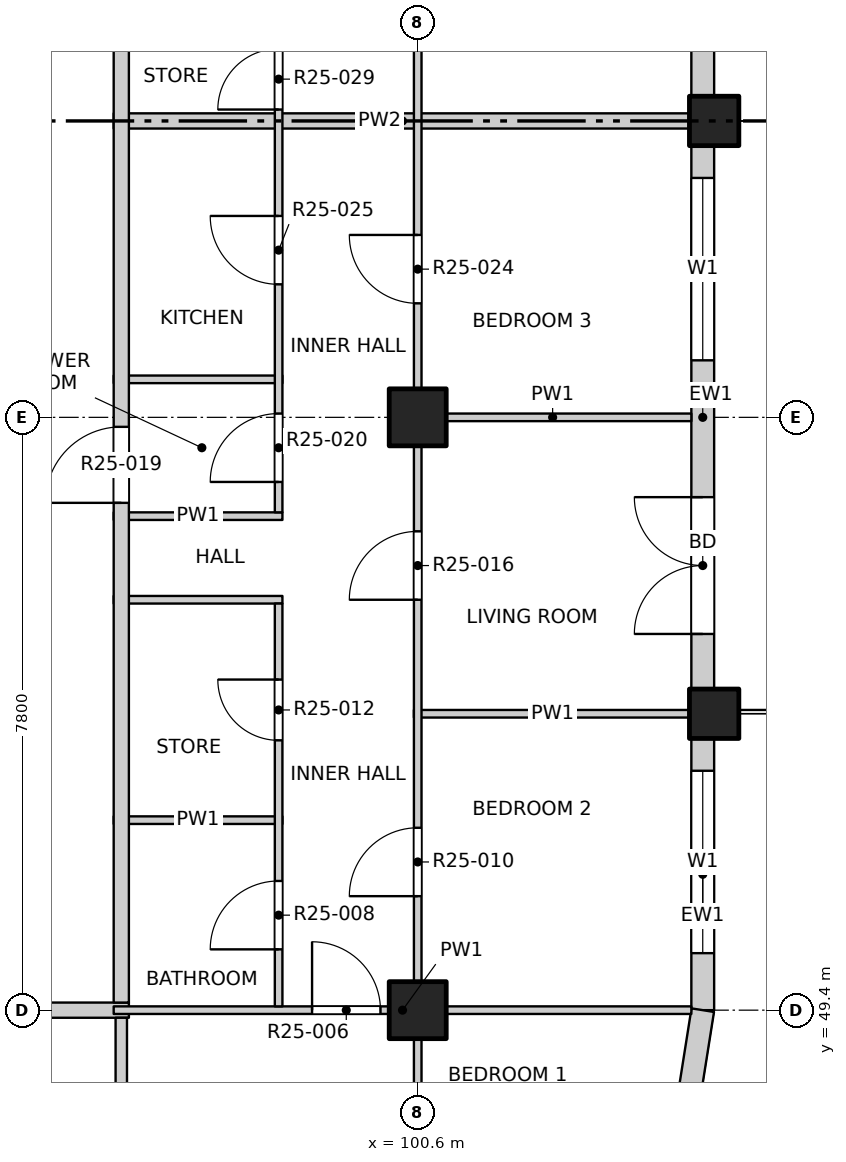
"""IFC4 building model, lengths in metres.
Left out: names, types, materials, properties, quantities, classifications, styles, units other than length and angle.
Written with IfcOpenShell. Run it as: python <this file> out.ifc"""

import sys

from ifc_helpers import new_model, si_unit, direction, frame, frame_2d, origin, origin_2d, place, context, subcontext, project, spatial, rectangle, extrude, element, fill, save


model = new_model("IFC4")
c1 = context("Model", 3, precision=1e-05, world=origin(), true_north=direction((0.0, 1.0)))
c2 = subcontext(c1, "Body", "Model", "MODEL_VIEW")
j1 = project(units=[si_unit("LENGTHUNIT", "METRE"), si_unit("PLANEANGLEUNIT", "RADIAN")], contexts=[c1])
p1 = place(None, origin())
s1 = spatial("IfcSite", under=j1, at=p1, CompositionType="ELEMENT")
p2 = place(p1, origin())
s2 = spatial("IfcBuilding", under=s1, at=p2, CompositionType="ELEMENT")
p3 = place(p2, frame((0.0, 0.0, 252.8)))
s3 = spatial("IfcBuildingStorey", under=s2, at=p3, CompositionType="ELEMENT", Elevation=252.8)
for number, where, z_axis, x_axis in (
    (1, (104.5, 53.3, -0.25), (0.0, 0.0, 1.0), (1.0, 0.0, 0.0)),
    (2, (104.5, 61.1, -0.25), (0.0, 0.0, 1.0), (1.0, 0.0, 0.0)),
):
    element("IfcColumn", number, at=place(p3, frame(where, z_axis=z_axis, x_axis=x_axis)), inside=s3, PredefinedType="COLUMN", context=c2, shape_type="SweptSolid", body=[
        extrude(rectangle(XDim=0.65, YDim=0.65, at=origin_2d()), origin(), (0.0, 0.0, 1.0), 3.4),
    ])
for number, where, z_axis, x_axis in (
    (3, (100.6, 49.4, -0.25), (0.0, 0.0, 1.0), (1.0, 0.0, 0.0)),
    (4, (100.6, 57.2, -0.25), (0.0, 0.0, 1.0), (1.0, 0.0, 0.0)),
):
    element("IfcColumn", number, at=place(p3, frame(where, z_axis=z_axis, x_axis=x_axis)), inside=s3, PredefinedType="COLUMN", context=c2, shape_type="SweptSolid", body=[
        extrude(rectangle(XDim=0.75, YDim=0.75, at=origin_2d()), origin(), (0.0, 0.0, 1.0), 3.4),
    ])
p4 = place(p3, frame((104.35, 49.4, 0.0), z_axis=(0.0, 0.0, 1.0), x_axis=(0.0, 1.0, 0.0)))
e5 = element("IfcWall", 5, at=p4, inside=s3, PredefinedType="SOLIDWALL", context=c2, shape_type="SweptSolid", body=[
    extrude(rectangle(XDim=3.575, YDim=0.3, at=frame_2d((1.788, 0.0))), origin(), (0.0, 0.0, 1.0), 2.7),
])
p5 = place(p4, frame((0.75, 0.0, 0.9)))
e6 = element("IfcOpeningElement", 6, at=p5, cuts=e5, PredefinedType="OPENING", context=c2, shape_type="SweptSolid", body=[
    extrude(rectangle(XDim=2.4, YDim=1.8, at=frame_2d((1.2, 0.9))), frame((0.0, 0.16, 0.0), z_axis=(0.0, -1.0, 0.0), x_axis=(1.0, 0.0, 0.0)), (0.0, 0.0, 1.0), 0.32),
])
p6 = place(p3, frame((104.35, 53.625, 0.0), z_axis=(0.0, 0.0, 1.0), x_axis=(0.0, 1.0, 0.0)))
e7 = element("IfcWall", 7, at=p6, inside=s3, PredefinedType="SOLIDWALL", context=c2, shape_type="SweptSolid", body=[
    extrude(rectangle(XDim=7.15, YDim=0.3, at=frame_2d((3.575, 0.0))), origin(), (0.0, 0.0, 1.0), 2.7),
])
p7 = place(p6, frame((0.725, 0.0, 0.0)))
e8 = element("IfcOpeningElement", 8, at=p7, cuts=e7, PredefinedType="OPENING", context=c2, shape_type="SweptSolid", body=[
    extrude(rectangle(XDim=1.8, YDim=2.4, at=frame_2d((0.9, 1.2))), frame((0.0, 0.16, 0.0), z_axis=(0.0, -1.0, 0.0), x_axis=(1.0, 0.0, 0.0)), (0.0, 0.0, 1.0), 0.32),
])
p8 = place(p6, frame((4.325, 0.0, 0.9)))
e9 = element("IfcOpeningElement", 9, at=p8, cuts=e7, PredefinedType="OPENING", context=c2, shape_type="SweptSolid", body=[
    extrude(rectangle(XDim=2.4, YDim=1.8, at=frame_2d((1.2, 0.9))), frame((0.0, 0.16, 0.0), z_axis=(0.0, -1.0, 0.0), x_axis=(1.0, 0.0, 0.0)), (0.0, 0.0, 1.0), 0.32),
])
p9 = place(p3, frame((104.35, 61.425, 0.0), z_axis=(0.0, 0.0, 1.0), x_axis=(0.0, 1.0, 0.0)))
e10 = element("IfcWall", 10, at=p9, inside=s3, PredefinedType="SOLIDWALL", context=c2, shape_type="SweptSolid", body=[
    extrude(rectangle(XDim=7.15, YDim=0.3, at=frame_2d((3.575, 0.0))), origin(), (0.0, 0.0, 1.0), 2.7),
])
p10 = place(p9, frame((0.725, 0.0, 0.0)))
e11 = element("IfcOpeningElement", 11, at=p10, cuts=e10, PredefinedType="OPENING", context=c2, shape_type="SweptSolid", body=[
    extrude(rectangle(XDim=1.8, YDim=2.4, at=frame_2d((0.9, 1.2))), frame((0.0, 0.16, 0.0), z_axis=(0.0, -1.0, 0.0), x_axis=(1.0, 0.0, 0.0)), (0.0, 0.0, 1.0), 0.32),
])
p11 = place(p9, frame((4.325, 0.0, 0.9)))
e12 = element("IfcOpeningElement", 12, at=p11, cuts=e10, PredefinedType="OPENING", context=c2, shape_type="SweptSolid", body=[
    extrude(rectangle(XDim=2.4, YDim=1.8, at=frame_2d((1.2, 0.9))), frame((0.0, 0.16, 0.0), z_axis=(0.0, -1.0, 0.0), x_axis=(1.0, 0.0, 0.0)), (0.0, 0.0, 1.0), 0.32),
])
p12 = place(p3, frame((104.167, 48.241, 0.0), z_axis=(0.0, 0.0, 1.0), x_axis=(0.156496880861, 0.987678452879, 0.0)))
e13 = element("IfcWall", 13, at=p12, inside=s3, PredefinedType="SOLIDWALL", context=c2, shape_type="SweptSolid", body=[
    extrude(rectangle(XDim=1.173, YDim=0.3, at=frame_2d((0.586, 0.0))), origin(), (0.0, 0.0, 1.0), 2.7),
])
p13 = place(p3, frame((73.2, 49.4, 0.0), z_axis=(0.0, 0.0, 1.0), x_axis=(1.0, 0.0, 0.0)))
e14 = element("IfcWall", 14, at=p13, inside=s3, PredefinedType="PARTITIONING", context=c2, shape_type="SweptSolid", body=[
    extrude(rectangle(XDim=23.6, YDim=0.2, at=frame_2d((11.8, 0.0))), origin(), (0.0, 0.0, 1.0), 3.15),
])
p14 = place(p13, frame((2.325, 0.0, 0.0)))
e15 = element("IfcOpeningElement", 15, at=p14, cuts=e14, PredefinedType="OPENING", context=c2, shape_type="SweptSolid", body=[
    extrude(rectangle(XDim=1.2, YDim=2.1, at=frame_2d((0.6, 1.05))), frame((0.0, 0.11, 0.0), z_axis=(0.0, -1.0, 0.0), x_axis=(1.0, 0.0, 0.0)), (0.0, 0.0, 1.0), 0.22),
])
p15 = place(p13, frame((15.1, 0.0, 0.0)))
e16 = element("IfcOpeningElement", 16, at=p15, cuts=e14, PredefinedType="OPENING", context=c2, shape_type="SweptSolid", body=[
    extrude(rectangle(XDim=1.2, YDim=2.1, at=frame_2d((0.6, 1.05))), frame((0.0, 0.11, 0.0), z_axis=(0.0, -1.0, 0.0), x_axis=(1.0, 0.0, 0.0)), (0.0, 0.0, 1.0), 0.22),
])
p16 = place(p3, frame((96.6, 49.4, 0.0), z_axis=(0.0, 0.0, 1.0), x_axis=(1.0, 0.0, 0.0)))
e17 = element("IfcWall", 17, at=p16, inside=s3, PredefinedType="PARTITIONING", context=c2, shape_type="SweptSolid", body=[
    extrude(rectangle(XDim=7.6, YDim=0.1, at=frame_2d((3.8, 0.0))), origin(), (0.0, 0.0, 1.0), 3.15),
])
p17 = place(p16, frame((2.61, 0.0, 0.0)))
e18 = element("IfcOpeningElement", 18, at=p17, cuts=e17, PredefinedType="OPENING", context=c2, shape_type="SweptSolid", body=[
    extrude(rectangle(XDim=0.9, YDim=2.1, at=frame_2d((0.45, 1.05))), frame((0.0, 0.06, 0.0), z_axis=(0.0, -1.0, 0.0), x_axis=(1.0, 0.0, 0.0)), (0.0, 0.0, 1.0), 0.12),
])
p18 = place(p3, frame((96.6, 51.9, 0.0), z_axis=(0.0, 0.0, 1.0), x_axis=(1.0, 0.0, 0.0)))
e19 = element("IfcWall", 19, at=p18, inside=s3, PredefinedType="PARTITIONING", context=c2, shape_type="SweptSolid", body=[
    extrude(rectangle(XDim=2.22, YDim=0.1, at=frame_2d((1.11, 0.0))), origin(), (0.0, 0.0, 1.0), 3.15),
])
p19 = place(p3, frame((100.55, 53.3, 0.0), z_axis=(0.0, 0.0, 1.0), x_axis=(1.0, 0.0, 0.0)))
e20 = element("IfcWall", 20, at=p19, inside=s3, PredefinedType="PARTITIONING", context=c2, shape_type="SweptSolid", body=[
    extrude(rectangle(XDim=3.65, YDim=0.1, at=frame_2d((1.825, 0.0))), origin(), (0.0, 0.0, 1.0), 3.15),
])
for number, where, z_axis, x_axis in (
    (21, (96.6, 54.8, 0.0), (0.0, 0.0, 1.0), (1.0, 0.0, 0.0)),
    (22, (96.6, 55.9, 0.0), (0.0, 0.0, 1.0), (1.0, 0.0, 0.0)),
):
    element("IfcWall", number, at=place(p3, frame(where, z_axis=z_axis, x_axis=x_axis)), inside=s3, PredefinedType="PARTITIONING", context=c2, shape_type="SweptSolid", body=[
        extrude(rectangle(XDim=2.22, YDim=0.1, at=frame_2d((1.11, 0.0))), origin(), (0.0, 0.0, 1.0), 3.15),
    ])
p20 = place(p3, frame((100.55, 57.2, 0.0), z_axis=(0.0, 0.0, 1.0), x_axis=(1.0, 0.0, 0.0)))
e23 = element("IfcWall", 23, at=p20, inside=s3, PredefinedType="PARTITIONING", context=c2, shape_type="SweptSolid", body=[
    extrude(rectangle(XDim=3.65, YDim=0.1, at=frame_2d((1.825, 0.0))), origin(), (0.0, 0.0, 1.0), 3.15),
])
p21 = place(p3, frame((96.6, 57.7, 0.0), z_axis=(0.0, 0.0, 1.0), x_axis=(1.0, 0.0, 0.0)))
e24 = element("IfcWall", 24, at=p21, inside=s3, PredefinedType="PARTITIONING", context=c2, shape_type="SweptSolid", body=[
    extrude(rectangle(XDim=2.22, YDim=0.1, at=frame_2d((1.11, 0.0))), origin(), (0.0, 0.0, 1.0), 3.15),
])
p22 = place(p3, frame((96.6, 61.1, 0.0), z_axis=(0.0, 0.0, 1.0), x_axis=(1.0, 0.0, 0.0)))
e25 = element("IfcWall", 25, at=p22, inside=s3, PredefinedType="PARTITIONING", context=c2, shape_type="SweptSolid", body=[
    extrude(rectangle(XDim=7.6, YDim=0.2, at=frame_2d((3.8, 0.0))), origin(), (0.0, 0.0, 1.0), 2.55),
])
p23 = place(p3, frame((96.7, 45.8, 0.0), z_axis=(0.0, 0.0, 1.0), x_axis=(0.0, 1.0, 0.0)))
e26 = element("IfcWall", 26, at=p23, inside=s3, PredefinedType="PARTITIONING", context=c2, shape_type="SweptSolid", body=[
    extrude(rectangle(XDim=3.5, YDim=0.15, at=frame_2d((1.75, 0.0))), origin(), (0.0, 0.0, 1.0), 3.15),
])
p24 = place(p3, frame((96.7, 49.5, 0.0), z_axis=(0.0, 0.0, 1.0), x_axis=(0.0, 1.0, 0.0)))
e27 = element("IfcWall", 27, at=p24, inside=s3, PredefinedType="PARTITIONING", context=c2, shape_type="SweptSolid", body=[
    extrude(rectangle(XDim=34.7, YDim=0.2, at=frame_2d((17.35, 0.0))), origin(), (0.0, 0.0, 1.0), 3.15),
])
p25 = place(p24, frame((6.575, 0.0, 0.0)))
e28 = element("IfcOpeningElement", 28, at=p25, cuts=e27, PredefinedType="OPENING", context=c2, shape_type="SweptSolid", body=[
    extrude(rectangle(XDim=1.0, YDim=2.1, at=frame_2d((0.5, 1.05))), frame((0.0, 0.11, 0.0), z_axis=(0.0, -1.0, 0.0), x_axis=(1.0, 0.0, 0.0)), (0.0, 0.0, 1.0), 0.22),
])
p26 = place(p24, frame((13.975, 0.0, 0.0)))
e29 = element("IfcOpeningElement", 29, at=p26, cuts=e27, PredefinedType="OPENING", context=c2, shape_type="SweptSolid", body=[
    extrude(rectangle(XDim=1.0, YDim=2.1, at=frame_2d((0.5, 1.05))), frame((0.0, 0.11, 0.0), z_axis=(0.0, -1.0, 0.0), x_axis=(1.0, 0.0, 0.0)), (0.0, 0.0, 1.0), 0.22),
])
p27 = place(p24, frame((26.525, 0.0, 0.0)))
e30 = element("IfcOpeningElement", 30, at=p27, cuts=e27, PredefinedType="OPENING", context=c2, shape_type="SweptSolid", body=[
    extrude(rectangle(XDim=1.0, YDim=2.1, at=frame_2d((0.5, 1.05))), frame((0.0, 0.11, 0.0), z_axis=(0.0, -1.0, 0.0), x_axis=(1.0, 0.0, 0.0)), (0.0, 0.0, 1.0), 0.22),
])
p28 = place(p3, frame((98.77, 49.45, 0.0), z_axis=(0.0, 0.0, 1.0), x_axis=(0.0, 1.0, 0.0)))
e31 = element("IfcWall", 31, at=p28, inside=s3, PredefinedType="PARTITIONING", context=c2, shape_type="SweptSolid", body=[
    extrude(rectangle(XDim=5.3, YDim=0.1, at=frame_2d((2.65, 0.0))), origin(), (0.0, 0.0, 1.0), 3.15),
])
p29 = place(p28, frame((0.75, 0.0, 0.0)))
e32 = element("IfcOpeningElement", 32, at=p29, cuts=e31, PredefinedType="OPENING", context=c2, shape_type="SweptSolid", body=[
    extrude(rectangle(XDim=0.9, YDim=2.1, at=frame_2d((0.45, 1.05))), frame((0.0, 0.06, 0.0), z_axis=(0.0, -1.0, 0.0), x_axis=(1.0, 0.0, 0.0)), (0.0, 0.0, 1.0), 0.12),
])
p30 = place(p28, frame((3.5, 0.0, 0.0)))
e33 = element("IfcOpeningElement", 33, at=p30, cuts=e31, PredefinedType="OPENING", context=c2, shape_type="SweptSolid", body=[
    extrude(rectangle(XDim=0.8, YDim=2.1, at=frame_2d((0.4, 1.05))), frame((0.0, 0.06, 0.0), z_axis=(0.0, -1.0, 0.0), x_axis=(1.0, 0.0, 0.0)), (0.0, 0.0, 1.0), 0.12),
])
p31 = place(p3, frame((98.77, 55.95, 0.0), z_axis=(0.0, 0.0, 1.0), x_axis=(0.0, 1.0, 0.0)))
e34 = element("IfcWall", 34, at=p31, inside=s3, PredefinedType="PARTITIONING", context=c2, shape_type="SweptSolid", body=[
    extrude(rectangle(XDim=6.2, YDim=0.1, at=frame_2d((3.1, 0.0))), origin(), (0.0, 0.0, 1.0), 3.15),
])
p32 = place(p31, frame((0.4, 0.0, 0.0)))
e35 = element("IfcOpeningElement", 35, at=p32, cuts=e34, PredefinedType="OPENING", context=c2, shape_type="SweptSolid", body=[
    extrude(rectangle(XDim=0.9, YDim=2.1, at=frame_2d((0.45, 1.05))), frame((0.0, 0.06, 0.0), z_axis=(0.0, -1.0, 0.0), x_axis=(1.0, 0.0, 0.0)), (0.0, 0.0, 1.0), 0.12),
])
p33 = place(p31, frame((3.0, 0.0, 0.0)))
e36 = element("IfcOpeningElement", 36, at=p33, cuts=e34, PredefinedType="OPENING", context=c2, shape_type="SweptSolid", body=[
    extrude(rectangle(XDim=0.9, YDim=2.1, at=frame_2d((0.45, 1.05))), frame((0.0, 0.06, 0.0), z_axis=(0.0, -1.0, 0.0), x_axis=(1.0, 0.0, 0.0)), (0.0, 0.0, 1.0), 0.12),
])
p34 = place(p31, frame((5.3, 0.0, 0.0)))
e37 = element("IfcOpeningElement", 37, at=p34, cuts=e34, PredefinedType="OPENING", context=c2, shape_type="SweptSolid", body=[
    extrude(rectangle(XDim=0.8, YDim=2.1, at=frame_2d((0.4, 1.05))), frame((0.0, 0.06, 0.0), z_axis=(0.0, -1.0, 0.0), x_axis=(1.0, 0.0, 0.0)), (0.0, 0.0, 1.0), 0.12),
])
p35 = place(p3, frame((100.6, 45.8, 0.0), z_axis=(0.0, 0.0, 1.0), x_axis=(0.0, 1.0, 0.0)))
e38 = element("IfcWall", 38, at=p35, inside=s3, PredefinedType="PARTITIONING", context=c2, shape_type="SweptSolid", body=[
    extrude(rectangle(XDim=38.4, YDim=0.1, at=frame_2d((19.2, 0.0))), origin(), (0.0, 0.0, 1.0), 3.15),
])
p36 = place(p35, frame((1.05, 0.0, 0.0)))
e39 = element("IfcOpeningElement", 39, at=p36, cuts=e38, PredefinedType="OPENING", context=c2, shape_type="SweptSolid", body=[
    extrude(rectangle(XDim=1.2, YDim=2.1, at=frame_2d((0.6, 1.05))), frame((0.0, 0.06, 0.0), z_axis=(0.0, -1.0, 0.0), x_axis=(1.0, 0.0, 0.0)), (0.0, 0.0, 1.0), 0.12),
])
p37 = place(p35, frame((5.1, 0.0, 0.0)))
e40 = element("IfcOpeningElement", 40, at=p37, cuts=e38, PredefinedType="OPENING", context=c2, shape_type="SweptSolid", body=[
    extrude(rectangle(XDim=0.9, YDim=2.1, at=frame_2d((0.45, 1.05))), frame((0.0, 0.06, 0.0), z_axis=(0.0, -1.0, 0.0), x_axis=(1.0, 0.0, 0.0)), (0.0, 0.0, 1.0), 0.12),
])
p38 = place(p35, frame((9.0, 0.0, 0.0)))
e41 = element("IfcOpeningElement", 41, at=p38, cuts=e38, PredefinedType="OPENING", context=c2, shape_type="SweptSolid", body=[
    extrude(rectangle(XDim=0.9, YDim=2.1, at=frame_2d((0.45, 1.05))), frame((0.0, 0.06, 0.0), z_axis=(0.0, -1.0, 0.0), x_axis=(1.0, 0.0, 0.0)), (0.0, 0.0, 1.0), 0.12),
])
p39 = place(p35, frame((12.9, 0.0, 0.0)))
e42 = element("IfcOpeningElement", 42, at=p39, cuts=e38, PredefinedType="OPENING", context=c2, shape_type="SweptSolid", body=[
    extrude(rectangle(XDim=0.9, YDim=2.1, at=frame_2d((0.45, 1.05))), frame((0.0, 0.06, 0.0), z_axis=(0.0, -1.0, 0.0), x_axis=(1.0, 0.0, 0.0)), (0.0, 0.0, 1.0), 0.12),
])
p40 = place(p35, frame((16.8, 0.0, 0.0)))
e43 = element("IfcOpeningElement", 43, at=p40, cuts=e38, PredefinedType="OPENING", context=c2, shape_type="SweptSolid", body=[
    extrude(rectangle(XDim=0.9, YDim=2.1, at=frame_2d((0.45, 1.05))), frame((0.0, 0.06, 0.0), z_axis=(0.0, -1.0, 0.0), x_axis=(1.0, 0.0, 0.0)), (0.0, 0.0, 1.0), 0.12),
])
p41 = place(p35, frame((20.7, 0.0, 0.0)))
e44 = element("IfcOpeningElement", 44, at=p41, cuts=e38, PredefinedType="OPENING", context=c2, shape_type="SweptSolid", body=[
    extrude(rectangle(XDim=0.9, YDim=2.1, at=frame_2d((0.45, 1.05))), frame((0.0, 0.06, 0.0), z_axis=(0.0, -1.0, 0.0), x_axis=(1.0, 0.0, 0.0)), (0.0, 0.0, 1.0), 0.12),
])
p42 = place(p35, frame((24.6, 0.0, 0.0)))
e45 = element("IfcOpeningElement", 45, at=p42, cuts=e38, PredefinedType="OPENING", context=c2, shape_type="SweptSolid", body=[
    extrude(rectangle(XDim=0.9, YDim=2.1, at=frame_2d((0.45, 1.05))), frame((0.0, 0.06, 0.0), z_axis=(0.0, -1.0, 0.0), x_axis=(1.0, 0.0, 0.0)), (0.0, 0.0, 1.0), 0.12),
])
p43 = place(p35, frame((28.5, 0.0, 0.0)))
e46 = element("IfcOpeningElement", 46, at=p43, cuts=e38, PredefinedType="OPENING", context=c2, shape_type="SweptSolid", body=[
    extrude(rectangle(XDim=0.9, YDim=2.1, at=frame_2d((0.45, 1.05))), frame((0.0, 0.06, 0.0), z_axis=(0.0, -1.0, 0.0), x_axis=(1.0, 0.0, 0.0)), (0.0, 0.0, 1.0), 0.12),
])
p44 = place(p35, frame((32.4, 0.0, 0.0)))
e47 = element("IfcOpeningElement", 47, at=p44, cuts=e38, PredefinedType="OPENING", context=c2, shape_type="SweptSolid", body=[
    extrude(rectangle(XDim=0.9, YDim=2.1, at=frame_2d((0.45, 1.05))), frame((0.0, 0.06, 0.0), z_axis=(0.0, -1.0, 0.0), x_axis=(1.0, 0.0, 0.0)), (0.0, 0.0, 1.0), 0.12),
])
p45 = place(p35, frame((36.15, 0.0, 0.0)))
e48 = element("IfcOpeningElement", 48, at=p45, cuts=e38, PredefinedType="OPENING", context=c2, shape_type="SweptSolid", body=[
    extrude(rectangle(XDim=1.2, YDim=2.1, at=frame_2d((0.6, 1.05))), frame((0.0, 0.06, 0.0), z_axis=(0.0, -1.0, 0.0), x_axis=(1.0, 0.0, 0.0)), (0.0, 0.0, 1.0), 0.12),
])
p46 = place(p5, origin())
e49 = element("IfcWindow", 49, at=p46, inside=s3, PartitioningType="DOUBLE_PANEL_VERTICAL", PredefinedType="WINDOW", context=c2, shape_type="SweptSolid", body=[
    extrude(rectangle(XDim=2.4, YDim=1.8, at=frame_2d((1.2, 0.9))), frame((0.0, 0.03, 0.0), z_axis=(0.0, -1.0, 0.0), x_axis=(1.0, 0.0, 0.0)), (0.0, 0.0, 1.0), 0.06),
])
fill(e6, e49)
p47 = place(p7, origin())
e50 = element("IfcDoor", 50, at=p47, inside=s3, OperationType="DOUBLE_DOOR_SINGLE_SWING", PredefinedType="DOOR", context=c2, shape_type="SweptSolid", body=[
    extrude(rectangle(XDim=1.8, YDim=2.4, at=frame_2d((0.9, 1.2))), frame((0.0, 0.025, 0.0), z_axis=(0.0, -1.0, 0.0), x_axis=(1.0, 0.0, 0.0)), (0.0, 0.0, 1.0), 0.05),
])
fill(e8, e50)
p48 = place(p8, origin())
e51 = element("IfcWindow", 51, at=p48, inside=s3, PartitioningType="DOUBLE_PANEL_VERTICAL", PredefinedType="WINDOW", context=c2, shape_type="SweptSolid", body=[
    extrude(rectangle(XDim=2.4, YDim=1.8, at=frame_2d((1.2, 0.9))), frame((0.0, 0.03, 0.0), z_axis=(0.0, -1.0, 0.0), x_axis=(1.0, 0.0, 0.0)), (0.0, 0.0, 1.0), 0.06),
])
fill(e9, e51)
p49 = place(p17, origin())
e52 = element("IfcDoor", 52, at=p49, inside=s3, OperationType="SINGLE_SWING_LEFT", PredefinedType="DOOR", context=c2, shape_type="SweptSolid", body=[
    extrude(rectangle(XDim=0.9, YDim=2.1, at=frame_2d((0.45, 1.05))), frame((0.0, 0.025, 0.0), z_axis=(0.0, -1.0, 0.0), x_axis=(1.0, 0.0, 0.0)), (0.0, 0.0, 1.0), 0.05),
])
fill(e18, e52)
p50 = place(p29, origin())
e53 = element("IfcDoor", 53, at=p50, inside=s3, OperationType="SINGLE_SWING_LEFT", PredefinedType="DOOR", context=c2, shape_type="SweptSolid", body=[
    extrude(rectangle(XDim=0.9, YDim=2.1, at=frame_2d((0.45, 1.05))), frame((0.0, 0.025, 0.0), z_axis=(0.0, -1.0, 0.0), x_axis=(1.0, 0.0, 0.0)), (0.0, 0.0, 1.0), 0.05),
])
fill(e32, e53)
p51 = place(p37, origin())
e54 = element("IfcDoor", 54, at=p51, inside=s3, OperationType="SINGLE_SWING_LEFT", PredefinedType="DOOR", context=c2, shape_type="SweptSolid", body=[
    extrude(rectangle(XDim=0.9, YDim=2.1, at=frame_2d((0.45, 1.05))), frame((0.0, 0.025, 0.0), z_axis=(0.0, -1.0, 0.0), x_axis=(1.0, 0.0, 0.0)), (0.0, 0.0, 1.0), 0.05),
])
fill(e40, e54)
p52 = place(p30, origin())
e55 = element("IfcDoor", 55, at=p52, inside=s3, OperationType="SINGLE_SWING_RIGHT", PredefinedType="DOOR", context=c2, shape_type="SweptSolid", body=[
    extrude(rectangle(XDim=0.8, YDim=2.1, at=frame_2d((0.4, 1.05))), frame((0.0, 0.025, 0.0), z_axis=(0.0, -1.0, 0.0), x_axis=(1.0, 0.0, 0.0)), (0.0, 0.0, 1.0), 0.05),
])
fill(e33, e55)
p53 = place(p38, origin())
e56 = element("IfcDoor", 56, at=p53, inside=s3, OperationType="SINGLE_SWING_LEFT", PredefinedType="DOOR", context=c2, shape_type="SweptSolid", body=[
    extrude(rectangle(XDim=0.9, YDim=2.1, at=frame_2d((0.45, 1.05))), frame((0.0, 0.025, 0.0), z_axis=(0.0, -1.0, 0.0), x_axis=(1.0, 0.0, 0.0)), (0.0, 0.0, 1.0), 0.05),
])
fill(e41, e56)
p54 = place(p25, origin())
e57 = element("IfcDoor", 57, at=p54, inside=s3, OperationType="SINGLE_SWING_LEFT", PredefinedType="DOOR", context=c2, shape_type="SweptSolid", body=[
    extrude(rectangle(XDim=1.0, YDim=2.1, at=frame_2d((0.5, 1.05))), frame((0.0, 0.025, 0.0), z_axis=(0.0, -1.0, 0.0), x_axis=(1.0, 0.0, 0.0)), (0.0, 0.0, 1.0), 0.05),
])
fill(e28, e57)
p55 = place(p32, origin())
e58 = element("IfcDoor", 58, at=p55, inside=s3, OperationType="SINGLE_SWING_LEFT", PredefinedType="DOOR", context=c2, shape_type="SweptSolid", body=[
    extrude(rectangle(XDim=0.9, YDim=2.1, at=frame_2d((0.45, 1.05))), frame((0.0, 0.025, 0.0), z_axis=(0.0, -1.0, 0.0), x_axis=(1.0, 0.0, 0.0)), (0.0, 0.0, 1.0), 0.05),
])
fill(e35, e58)
p56 = place(p39, origin())
e59 = element("IfcDoor", 59, at=p56, inside=s3, OperationType="SINGLE_SWING_RIGHT", PredefinedType="DOOR", context=c2, shape_type="SweptSolid", body=[
    extrude(rectangle(XDim=0.9, YDim=2.1, at=frame_2d((0.45, 1.05))), frame((0.0, 0.025, 0.0), z_axis=(0.0, -1.0, 0.0), x_axis=(1.0, 0.0, 0.0)), (0.0, 0.0, 1.0), 0.05),
])
fill(e42, e59)
p57 = place(p33, origin())
e60 = element("IfcDoor", 60, at=p57, inside=s3, OperationType="SINGLE_SWING_RIGHT", PredefinedType="DOOR", context=c2, shape_type="SweptSolid", body=[
    extrude(rectangle(XDim=0.9, YDim=2.1, at=frame_2d((0.45, 1.05))), frame((0.0, 0.025, 0.0), z_axis=(0.0, -1.0, 0.0), x_axis=(1.0, 0.0, 0.0)), (0.0, 0.0, 1.0), 0.05),
])
fill(e36, e60)
p58 = place(p34, origin())
e61 = element("IfcDoor", 61, at=p58, inside=s3, OperationType="SINGLE_SWING_LEFT", PredefinedType="DOOR", context=c2, shape_type="SweptSolid", body=[
    extrude(rectangle(XDim=0.8, YDim=2.1, at=frame_2d((0.4, 1.05))), frame((0.0, 0.025, 0.0), z_axis=(0.0, -1.0, 0.0), x_axis=(1.0, 0.0, 0.0)), (0.0, 0.0, 1.0), 0.05),
])
fill(e37, e61)
save(model, sys.argv[1])
